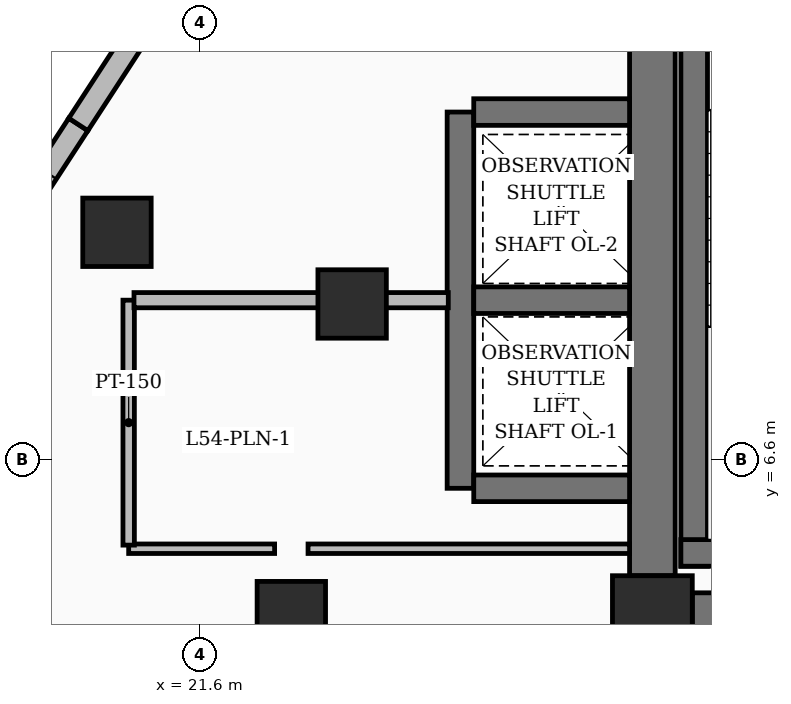
"""IFC4 building model, lengths in metres.
Left out: names, types, materials, properties, quantities, classifications, styles, units other than length and angle.
Written with IfcOpenShell. Run it as: python <this file> out.ifc"""

import sys

from ifc_helpers import new_model, si_unit, direction, frame, frame_2d, origin, origin_2d, place, context, subcontext, project, spatial, rectangle, extrude, element, save


model = new_model("IFC4")
c1 = context("Model", 3, precision=1e-05, world=origin(), true_north=direction((0.0, 1.0)))
c2 = subcontext(c1, "Body", "Model", "MODEL_VIEW")
j1 = project(units=[si_unit("LENGTHUNIT", "METRE"), si_unit("PLANEANGLEUNIT", "RADIAN")], contexts=[c1])
p1 = place(None, origin())
s1 = spatial("IfcSite", under=j1, at=p1, CompositionType="ELEMENT")
p2 = place(p1, origin())
s2 = spatial("IfcBuilding", under=s1, at=p2, CompositionType="ELEMENT")
p3 = place(p2, frame((0.0, 0.0, 210.75)))
s3 = spatial("IfcBuildingStorey", under=s2, at=p3, CompositionType="ELEMENT", Elevation=210.75)
p4 = place(p3, frame((27.55, 4.55, 0.0), z_axis=(0.0, 0.0, 1.0), x_axis=(1.0, 0.0, 0.0)))
e1 = element("IfcColumn", 1, at=p4, inside=s3, PredefinedType="COLUMN", context=c2, shape_type="SweptSolid", body=[
    extrude(rectangle(XDim=1.05, YDim=1.05, at=origin_2d()), origin(), (0.0, 0.0, 1.0), 3.75),
])
for number, where, z_axis, x_axis in (
    (2, (22.8, 4.55, 0.0), (0.0, 0.0, 1.0), (1.0, 0.0, 0.0)),
    (3, (23.6, 8.65, 0.0), (0.0, 0.0, 1.0), (1.0, 0.0, 0.0)),
):
    element("IfcColumn", number, at=place(p3, frame(where, z_axis=z_axis, x_axis=x_axis)), inside=s3, PredefinedType="COLUMN", context=c2, shape_type="SweptSolid", body=[
        extrude(rectangle(XDim=0.9, YDim=0.9, at=origin_2d()), origin(), (0.0, 0.0, 1.0), 3.75),
    ])
p5 = place(p3, frame((28.075, 4.55, 0.0), z_axis=(0.0, 0.0, 1.0), x_axis=(1.0, 0.0, 0.0)))
e4 = element("IfcWall", 4, at=p5, inside=s3, PredefinedType="SHEAR", context=c2, shape_type="SweptSolid", body=[
    extrude(rectangle(XDim=6.55, YDim=0.6, at=frame_2d((3.275, 0.0))), origin(), (0.0, 0.0, 1.0), 3.75),
])
p6 = place(p3, frame((27.55, 5.075, 0.0), z_axis=(0.0, 0.0, 1.0), x_axis=(0.0, 1.0, 0.0)))
e5 = element("IfcWall", 5, at=p6, inside=s3, PredefinedType="SHEAR", context=c2, shape_type="SweptSolid", body=[
    extrude(rectangle(XDim=9.15, YDim=0.6, at=frame_2d((4.575, 0.0))), origin(), (0.0, 0.0, 1.0), 3.75),
])
p7 = place(p3, frame((28.1, 5.2, 0.0), z_axis=(0.0, 0.0, 1.0), x_axis=(0.0, 1.0, 0.0)))
e6 = element("IfcWall", 6, at=p7, inside=s3, PredefinedType="SOLIDWALL", context=c2, shape_type="SweptSolid", body=[
    extrude(rectangle(XDim=9.25, YDim=0.35, at=frame_2d((4.625, 0.0))), origin(), (0.0, 0.0, 1.0), 3.75),
])
p8 = place(p3, frame((27.925, 5.375, 0.0), z_axis=(0.0, 0.0, 1.0), x_axis=(1.0, 0.0, 0.0)))
e7 = element("IfcWall", 7, at=p8, inside=s3, PredefinedType="SOLIDWALL", context=c2, shape_type="SweptSolid", body=[
    extrude(rectangle(XDim=3.55, YDim=0.35, at=frame_2d((1.775, 0.0))), origin(), (0.0, 0.0, 1.0), 3.75),
])
p9 = place(p3, frame((25.025, 6.225, 0.0), z_axis=(0.0, 0.0, 1.0), x_axis=(0.0, 1.0, 0.0)))
e8 = element("IfcWall", 8, at=p9, inside=s3, PredefinedType="SOLIDWALL", context=c2, shape_type="SweptSolid", body=[
    extrude(rectangle(XDim=4.95, YDim=0.35, at=frame_2d((2.475, 0.0))), origin(), (0.0, 0.0, 1.0), 3.75),
])
for number, where, z_axis, x_axis in (
    (9, (25.2, 6.225, 0.0), (0.0, 0.0, 1.0), (1.0, 0.0, 0.0)),
    (10, (25.2, 8.7, 0.0), (0.0, 0.0, 1.0), (1.0, 0.0, 0.0)),
    (11, (25.2, 11.175, 0.0), (0.0, 0.0, 1.0), (1.0, 0.0, 0.0)),
):
    element("IfcWall", number, at=place(p3, frame(where, z_axis=z_axis, x_axis=x_axis)), inside=s3, PredefinedType="SOLIDWALL", context=c2, shape_type="SweptSolid", body=[
        extrude(rectangle(XDim=2.05, YDim=0.35, at=frame_2d((1.025, 0.0))), origin(), (0.0, 0.0, 1.0), 3.75),
    ])
p10 = place(p3, frame((20.506, 9.593, 0.0), z_axis=(0.0, 0.0, 1.0), x_axis=(1.0, 0.0, 0.0)))
e12 = element("IfcColumn", 12, at=p10, inside=s3, PredefinedType="COLUMN", context=c2, shape_type="SweptSolid", body=[
    extrude(rectangle(XDim=0.9, YDim=0.9, at=origin_2d()), origin(), (0.0, 0.0, 1.0), 3.75),
])
p11 = place(p3, frame((16.441, 5.55, 0.0), z_axis=(0.0, 0.0, 1.0), x_axis=(0.545651760549, 0.838012026292, 0.0)))
e13 = element("IfcWall", 13, at=p11, inside=s3, PredefinedType="SOLIDWALL", context=c2, shape_type="SweptSolid", body=[
    extrude(rectangle(XDim=6.518, YDim=0.3, at=frame_2d((3.259, 0.0))), origin(), (0.0, 0.0, 1.0), 3.5),
])
p12 = place(p11, frame((1.36, 0.0, 0.55)))
e14 = element("IfcOpeningElement", 14, at=p12, cuts=e13, PredefinedType="OPENING", context=c2, shape_type="SweptSolid", body=[
    extrude(rectangle(XDim=2.1, YDim=2.4, at=frame_2d((1.05, 1.2))), frame((0.0, 0.16, 0.0), z_axis=(0.0, -1.0, 0.0), x_axis=(1.0, 0.0, 0.0)), (0.0, 0.0, 1.0), 0.32),
])
p13 = place(p11, frame((4.56, 0.0, 0.8)))
e15 = element("IfcOpeningElement", 15, at=p13, cuts=e13, PredefinedType="OPENING", context=c2, shape_type="SweptSolid", body=[
    extrude(rectangle(XDim=1.2, YDim=1.8, at=frame_2d((0.6, 0.9))), frame((0.0, 0.16, 0.0), z_axis=(0.0, -1.0, 0.0), x_axis=(1.0, 0.0, 0.0)), (0.0, 0.0, 1.0), 0.32),
])
p14 = place(p3, frame((19.998, 11.012, 0.0), z_axis=(0.0, 0.0, 1.0), x_axis=(0.545631860444, 0.838024983439, 0.0)))
e16 = element("IfcWall", 16, at=p14, inside=s3, PredefinedType="SOLIDWALL", context=c2, shape_type="SweptSolid", body=[
    extrude(rectangle(XDim=6.853, YDim=0.3, at=frame_2d((3.426, 0.0))), origin(), (0.0, 0.0, 1.0), 3.5),
])
p15 = place(p14, frame((2.625, 0.0, 0.6)))
e17 = element("IfcOpeningElement", 17, at=p15, cuts=e16, PredefinedType="OPENING", context=c2, shape_type="SweptSolid", body=[
    extrude(rectangle(XDim=1.8, YDim=2.1, at=frame_2d((0.9, 1.05))), frame((0.0, 0.16, 0.0), z_axis=(0.0, -1.0, 0.0), x_axis=(1.0, 0.0, 0.0)), (0.0, 0.0, 1.0), 0.32),
])
p16 = place(p3, frame((22.58, 5.43, 0.0), z_axis=(0.0, 0.0, 1.0), x_axis=(-1.0, 0.0, 0.0)))
e18 = element("IfcWall", 18, at=p16, inside=s3, PredefinedType="PARTITIONING", context=c2, shape_type="SweptSolid", body=[
    extrude(rectangle(XDim=1.92, YDim=0.125, at=frame_2d((0.96, 0.0))), origin(), (0.0, 0.0, 1.0), 2.82),
])
p17 = place(p3, frame((27.25, 5.43, 0.0), z_axis=(0.0, 0.0, 1.0), x_axis=(-1.0, 0.0, 0.0)))
e19 = element("IfcWall", 19, at=p17, inside=s3, PredefinedType="PARTITIONING", context=c2, shape_type="SweptSolid", body=[
    extrude(rectangle(XDim=4.23, YDim=0.125, at=frame_2d((2.115, 0.0))), origin(), (0.0, 0.0, 1.0), 3.5),
])
p18 = place(p3, frame((20.66, 5.478, 0.0), z_axis=(0.0, 0.0, 1.0), x_axis=(0.0, 1.0, 0.0)))
e20 = element("IfcWall", 20, at=p18, inside=s3, PredefinedType="PARTITIONING", context=c2, shape_type="SweptSolid", body=[
    extrude(rectangle(XDim=3.222, YDim=0.15, at=frame_2d((1.611, 0.0))), origin(), (0.0, 0.0, 1.0), 3.5),
])
p19 = place(p3, frame((23.6, 8.7, 0.0), z_axis=(0.0, 0.0, 1.0), x_axis=(-1.0, 0.0, 0.0)))
e21 = element("IfcWall", 21, at=p19, inside=s3, PredefinedType="PARTITIONING", context=c2, shape_type="SweptSolid", body=[
    extrude(rectangle(XDim=2.87, YDim=0.2, at=frame_2d((1.435, 0.0))), origin(), (0.0, 0.0, 1.0), 2.685),
])
p20 = place(p3, frame((24.865, 8.7, 0.0), z_axis=(0.0, 0.0, 1.0), x_axis=(-1.0, 0.0, 0.0)))
e22 = element("IfcWall", 22, at=p20, inside=s3, PredefinedType="PARTITIONING", context=c2, shape_type="SweptSolid", body=[
    extrude(rectangle(XDim=1.265, YDim=0.2, at=frame_2d((0.632, 0.0))), origin(), (0.0, 0.0, 1.0), 3.5),
])
save(model, sys.argv[1])
